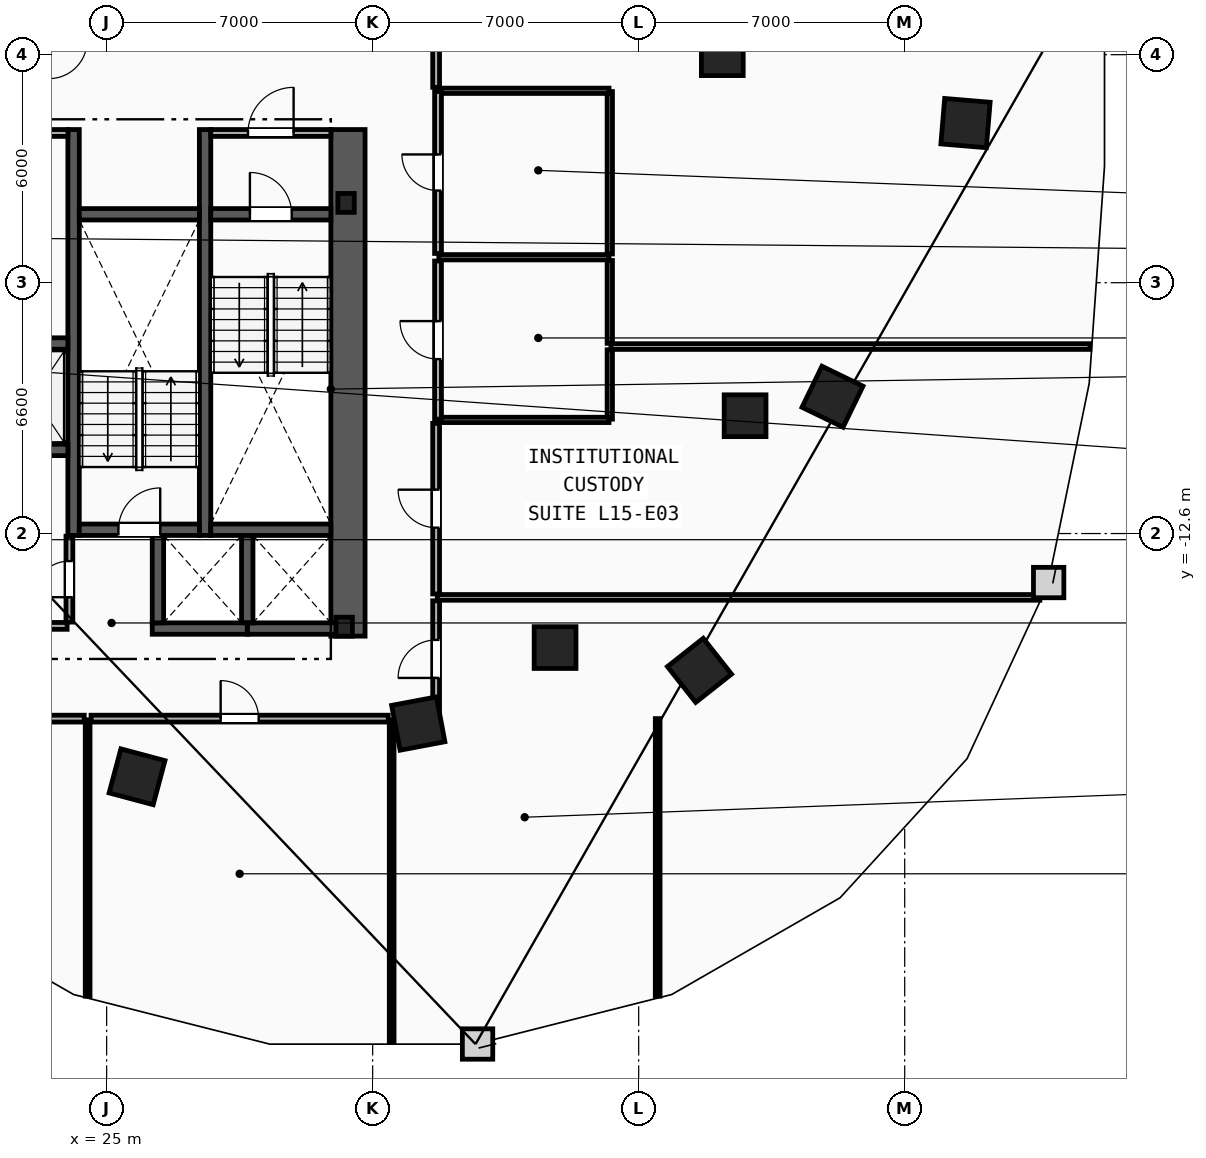
"""IFC4 building model, lengths in metres.
Left out: names, types, materials, properties, quantities, classifications, styles, units other than length and angle.
Written with IfcOpenShell. Run it as: python <this file> out.ifc"""

import sys

from ifc_helpers import new_model, si_unit, direction, frame, frame_2d, origin, origin_2d, place, context, subcontext, project, spatial, rectangle, i_section, extrude, element, fill, save


model = new_model("IFC4")
c1 = context("Model", 3, precision=1e-05, world=origin(), true_north=direction((0.0, 1.0)))
c2 = subcontext(c1, "Body", "Model", "MODEL_VIEW")
j1 = project(units=[si_unit("LENGTHUNIT", "METRE"), si_unit("PLANEANGLEUNIT", "RADIAN")], contexts=[c1])
p1 = place(None, origin())
s1 = spatial("IfcSite", under=j1, at=p1, CompositionType="ELEMENT")
p2 = place(p1, origin())
s2 = spatial("IfcBuilding", under=s1, at=p2, CompositionType="ELEMENT")
p3 = place(p2, frame((0.0, 0.0, 62.0)))
s3 = spatial("IfcBuildingStorey", under=s2, at=p3, CompositionType="ELEMENT", Elevation=62.0)
for number, where, z_axis, x_axis in (
    (1, (31.3, -3.9, 0.0), (0.0, 0.0, 1.0), (1.0, 0.0, 0.0)),
    (2, (31.25, -15.05, 0.0), (0.0, 0.0, 1.0), (1.0, 0.0, 0.0)),
):
    element("IfcColumn", number, at=place(p3, frame(where, z_axis=z_axis, x_axis=x_axis)), inside=s3, PredefinedType="COLUMN", context=c2, shape_type="SweptSolid", body=[
        extrude(i_section(OverallWidth=0.432, OverallDepth=0.498, WebThickness=0.056, FlangeThickness=0.089, FilletRadius=0.018, at=origin_2d()), origin(), (0.0, 0.0, 1.0), 3.8),
    ])
for number, where, z_axis, x_axis in (
    (3, (41.2, 0.0, 0.0), (0.0, 0.0, 1.0), (1.0, 0.0, 0.0)),
    (4, (41.8, -9.5, 0.0), (0.0, 0.0, 1.0), (1.0, 0.0, 0.0)),
    (5, (36.8, -15.6, 0.0), (0.0, 0.0, 1.0), (1.0, 0.0, 0.0)),
):
    element("IfcColumn", number, at=place(p3, frame(where, z_axis=z_axis, x_axis=x_axis)), inside=s3, PredefinedType="COLUMN", context=c2, shape_type="SweptSolid", body=[
        extrude(rectangle(XDim=1.1, YDim=1.1, at=origin_2d()), origin(), (0.0, 0.0, 1.0), 3.8),
    ])
for number, where, z_axis, x_axis in (
    (6, (25.8, -19.0, 0.0), (0.0, 0.0, 1.0), (0.966, -0.259, 0.0)),
    (7, (33.2, -17.6, 0.0), (0.0, 0.0, 1.0), (0.983, 0.186, 0.0)),
    (8, (40.6, -16.2, 0.0), (0.0, 0.0, 1.0), (0.785, 0.619, 0.0)),
    (9, (44.1, -9.0, 0.0), (0.0, 0.0, 1.0), (0.437, 0.899, 0.0)),
    (10, (47.6, -1.8, 0.0), (0.0, 0.0, 1.0), (0.084, 0.997, 0.0)),
):
    element("IfcColumn", number, at=place(p3, frame(where, z_axis=z_axis, x_axis=x_axis)), inside=s3, PredefinedType="COLUMN", context=c2, shape_type="SweptSolid", body=[
        extrude(rectangle(XDim=1.2, YDim=1.2, at=origin_2d()), origin(), (0.0, 0.0, 1.0), 3.8),
    ])
p4 = place(p3, frame((31.35, -15.3, 0.0), z_axis=(0.0, 0.0, 1.0), x_axis=(0.0, 1.0, 0.0)))
e11 = element("IfcWall", 11, at=p4, inside=s3, PredefinedType="SHEAR", context=c2, shape_type="SweptSolid", body=[
    extrude(rectangle(XDim=13.33, YDim=0.9, at=frame_2d((6.665, 0.0))), origin(), (0.0, 0.0, 1.0), 3.5),
])
for number, where, z_axis, x_axis in (
    (12, (27.59, -12.65, 0.0), (0.0, 0.0, 1.0), (0.0, 1.0, 0.0)),
    (13, (24.13, -12.65, 0.0), (0.0, 0.0, 1.0), (0.0, 1.0, 0.0)),
):
    element("IfcWall", number, at=place(p3, frame(where, z_axis=z_axis, x_axis=x_axis)), inside=s3, PredefinedType="SHEAR", context=c2, shape_type="SweptSolid", body=[
        extrude(rectangle(XDim=10.68, YDim=0.3, at=frame_2d((5.34, 0.0))), origin(), (0.0, 0.0, 1.0), 3.5),
    ])
p5 = place(p3, frame((27.74, -4.2, 0.0), z_axis=(0.0, 0.0, 1.0), x_axis=(1.0, 0.0, 0.0)))
e14 = element("IfcWall", 14, at=p5, inside=s3, PredefinedType="SHEAR", context=c2, shape_type="SweptSolid", body=[
    extrude(rectangle(XDim=3.16, YDim=0.3, at=frame_2d((1.58, 0.0))), origin(), (0.0, 0.0, 1.0), 3.5),
])
p6 = place(p5, frame((1.03, 0.0, 0.0)))
e15 = element("IfcOpeningElement", 15, at=p6, cuts=e14, PredefinedType="OPENING", context=c2, shape_type="SweptSolid", body=[
    extrude(rectangle(XDim=1.1, YDim=2.15, at=frame_2d((0.55, 1.075))), frame((0.0, 0.16, 0.0), z_axis=(0.0, -1.0, 0.0), x_axis=(1.0, 0.0, 0.0)), (0.0, 0.0, 1.0), 0.32),
])
p7 = place(p3, frame((27.74, -12.5, 0.0), z_axis=(0.0, 0.0, 1.0), x_axis=(1.0, 0.0, 0.0)))
e16 = element("IfcWall", 16, at=p7, inside=s3, PredefinedType="SHEAR", context=c2, shape_type="SweptSolid", body=[
    extrude(rectangle(XDim=3.16, YDim=0.3, at=frame_2d((1.58, 0.0))), origin(), (0.0, 0.0, 1.0), 3.5),
])
p8 = place(p3, frame((24.28, -12.5, 0.0), z_axis=(0.0, 0.0, 1.0), x_axis=(1.0, 0.0, 0.0)))
e17 = element("IfcWall", 17, at=p8, inside=s3, PredefinedType="SHEAR", context=c2, shape_type="SweptSolid", body=[
    extrude(rectangle(XDim=3.16, YDim=0.3, at=frame_2d((1.58, 0.0))), origin(), (0.0, 0.0, 1.0), 3.5),
])
p9 = place(p8, frame((1.03, 0.0, 0.0)))
e18 = element("IfcOpeningElement", 18, at=p9, cuts=e17, PredefinedType="OPENING", context=c2, shape_type="SweptSolid", body=[
    extrude(rectangle(XDim=1.1, YDim=2.15, at=frame_2d((0.55, 1.075))), frame((0.0, 0.16, 0.0), z_axis=(0.0, -1.0, 0.0), x_axis=(1.0, 0.0, 0.0)), (0.0, 0.0, 1.0), 0.32),
])
p10 = place(p3, frame((24.28, -4.2, 0.0), z_axis=(0.0, 0.0, 1.0), x_axis=(1.0, 0.0, 0.0)))
e19 = element("IfcWall", 19, at=p10, inside=s3, PredefinedType="SHEAR", context=c2, shape_type="SweptSolid", body=[
    extrude(rectangle(XDim=3.16, YDim=0.3, at=frame_2d((1.58, 0.0))), origin(), (0.0, 0.0, 1.0), 3.5),
])
p11 = place(p3, frame((20.98, -2.06, 0.0), z_axis=(0.0, 0.0, 1.0), x_axis=(1.0, 0.0, 0.0)))
e20 = element("IfcWall", 20, at=p11, inside=s3, PredefinedType="PARTITIONING", context=c2, shape_type="SweptSolid", body=[
    extrude(rectangle(XDim=3.0, YDim=0.18, at=frame_2d((1.5, 0.0))), origin(), (0.0, 0.0, 1.0), 3.5),
])
p12 = place(p11, frame((0.9, 0.0, 0.0)))
e21 = element("IfcOpeningElement", 21, at=p12, cuts=e20, PredefinedType="OPENING", context=c2, shape_type="SweptSolid", body=[
    extrude(rectangle(XDim=1.2, YDim=2.15, at=frame_2d((0.6, 1.075))), frame((0.0, 0.1, 0.0), z_axis=(0.0, -1.0, 0.0), x_axis=(1.0, 0.0, 0.0)), (0.0, 0.0, 1.0), 0.2),
])
p13 = place(p3, frame((27.74, -2.06, 0.0), z_axis=(0.0, 0.0, 1.0), x_axis=(1.0, 0.0, 0.0)))
e22 = element("IfcWall", 22, at=p13, inside=s3, PredefinedType="PARTITIONING", context=c2, shape_type="SweptSolid", body=[
    extrude(rectangle(XDim=3.16, YDim=0.18, at=frame_2d((1.58, 0.0))), origin(), (0.0, 0.0, 1.0), 3.5),
])
p14 = place(p13, frame((0.98, 0.0, 0.0)))
e23 = element("IfcOpeningElement", 23, at=p14, cuts=e22, PredefinedType="OPENING", context=c2, shape_type="SweptSolid", body=[
    extrude(rectangle(XDim=1.2, YDim=2.15, at=frame_2d((0.6, 1.075))), frame((0.0, 0.1, 0.0), z_axis=(0.0, -1.0, 0.0), x_axis=(1.0, 0.0, 0.0)), (0.0, 0.0, 1.0), 0.2),
])
p15 = place(p3, frame((21.88, -7.6, 0.0), z_axis=(0.0, 0.0, 1.0), x_axis=(1.0, 0.0, 0.0)))
e24 = element("IfcWall", 24, at=p15, inside=s3, PredefinedType="SHEAR", context=c2, shape_type="SweptSolid", body=[
    extrude(rectangle(XDim=2.1, YDim=0.3, at=frame_2d((1.05, 0.0))), origin(), (0.0, 0.0, 1.0), 3.5),
])
p16 = place(p15, frame((0.475, 0.0, 0.0)))
e25 = element("IfcOpeningElement", 25, at=p16, cuts=e24, PredefinedType="OPENING", context=c2, shape_type="SweptSolid", body=[
    extrude(rectangle(XDim=1.15, YDim=2.2, at=frame_2d((0.575, 1.1))), frame((0.0, 0.16, 0.0), z_axis=(0.0, -1.0, 0.0), x_axis=(1.0, 0.0, 0.0)), (0.0, 0.0, 1.0), 0.32),
])
p17 = place(p3, frame((21.88, -10.4, 0.0), z_axis=(0.0, 0.0, 1.0), x_axis=(1.0, 0.0, 0.0)))
e26 = element("IfcWall", 26, at=p17, inside=s3, PredefinedType="SHEAR", context=c2, shape_type="SweptSolid", body=[
    extrude(rectangle(XDim=2.1, YDim=0.3, at=frame_2d((1.05, 0.0))), origin(), (0.0, 0.0, 1.0), 3.5),
])
p18 = place(p3, frame((28.7, -15.1, 0.0), z_axis=(0.0, 0.0, 1.0), x_axis=(1.0, 0.0, 0.0)))
e27 = element("IfcWall", 27, at=p18, inside=s3, PredefinedType="SHEAR", context=c2, shape_type="SweptSolid", body=[
    extrude(rectangle(XDim=2.5, YDim=0.3, at=frame_2d((1.25, 0.0))), origin(), (0.0, 0.0, 1.0), 3.5),
])
p19 = place(p3, frame((28.7, -14.95, 0.0), z_axis=(0.0, 0.0, 1.0), x_axis=(0.0, 1.0, 0.0)))
e28 = element("IfcWall", 28, at=p19, inside=s3, PredefinedType="SHEAR", context=c2, shape_type="SweptSolid", body=[
    extrude(rectangle(XDim=2.3, YDim=0.3, at=frame_2d((1.15, 0.0))), origin(), (0.0, 0.0, 1.0), 3.5),
])
p20 = place(p3, frame((26.2, -15.1, 0.0), z_axis=(0.0, 0.0, 1.0), x_axis=(1.0, 0.0, 0.0)))
e29 = element("IfcWall", 29, at=p20, inside=s3, PredefinedType="SHEAR", context=c2, shape_type="SweptSolid", body=[
    extrude(rectangle(XDim=2.5, YDim=0.3, at=frame_2d((1.25, 0.0))), origin(), (0.0, 0.0, 1.0), 3.5),
])
p21 = place(p3, frame((26.35, -14.95, 0.0), z_axis=(0.0, 0.0, 1.0), x_axis=(0.0, 1.0, 0.0)))
e30 = element("IfcWall", 30, at=p21, inside=s3, PredefinedType="SHEAR", context=c2, shape_type="SweptSolid", body=[
    extrude(rectangle(XDim=2.3, YDim=0.3, at=frame_2d((1.15, 0.0))), origin(), (0.0, 0.0, 1.0), 3.5),
])
p22 = place(p3, frame((21.35, -15.03, 0.0), z_axis=(0.0, 0.0, 1.0), x_axis=(1.0, 0.0, 0.0)))
e31 = element("IfcWall", 31, at=p22, inside=s3, PredefinedType="PARTITIONING", context=c2, shape_type="SweptSolid", body=[
    extrude(rectangle(XDim=2.61, YDim=0.18, at=frame_2d((1.305, 0.0))), origin(), (0.0, 0.0, 1.0), 2.573),
])
p23 = place(p3, frame((24.02, -14.93, 0.0), z_axis=(0.0, 0.0, 1.0), x_axis=(0.0, 1.0, 0.0)))
e32 = element("IfcWall", 32, at=p23, inside=s3, PredefinedType="PARTITIONING", context=c2, shape_type="SweptSolid", body=[
    extrude(rectangle(XDim=2.26, YDim=0.18, at=frame_2d((1.13, 0.0))), origin(), (0.0, 0.0, 1.0), 3.5),
])
p24 = place(p23, frame((0.655, 0.0, 0.0)))
e33 = element("IfcOpeningElement", 33, at=p24, cuts=e32, PredefinedType="OPENING", context=c2, shape_type="SweptSolid", body=[
    extrude(rectangle(XDim=0.95, YDim=2.1, at=frame_2d((0.475, 1.05))), frame((0.0, 0.1, 0.0), z_axis=(0.0, -1.0, 0.0), x_axis=(1.0, 0.0, 0.0)), (0.0, 0.0, 1.0), 0.2),
])
p25 = place(p3, frame((38.24, -9.59, 0.0), z_axis=(0.0, 0.0, 1.0), x_axis=(0.0, 1.0, 0.0)))
e34 = element("IfcWall", 34, at=p25, inside=s3, PredefinedType="PARTITIONING", context=c2, shape_type="SweptSolid", body=[
    extrude(rectangle(XDim=1.825, YDim=0.14, at=frame_2d((0.913, 0.0))), origin(), (0.0, 0.0, 1.0), 3.5),
])
p26 = place(p3, frame((38.24, -7.595, 0.0), z_axis=(0.0, 0.0, 1.0), x_axis=(0.0, 1.0, 0.0)))
e35 = element("IfcWall", 35, at=p26, inside=s3, PredefinedType="PARTITIONING", context=c2, shape_type="SweptSolid", body=[
    extrude(rectangle(XDim=2.18, YDim=0.14, at=frame_2d((1.09, 0.0))), origin(), (0.0, 0.0, 1.0), 3.5),
])
p27 = place(p3, frame((38.24, -5.245, 0.0), z_axis=(0.0, 0.0, 1.0), x_axis=(0.0, 1.0, 0.0)))
e36 = element("IfcWall", 36, at=p27, inside=s3, PredefinedType="PARTITIONING", context=c2, shape_type="SweptSolid", body=[
    extrude(rectangle(XDim=4.275, YDim=0.14, at=frame_2d((2.138, 0.0))), origin(), (0.0, 0.0, 1.0), 3.5),
])
for number, where, z_axis, x_axis in (
    (37, (33.74, -0.95, 0.0), (0.0, 0.0, 1.0), (1.0, 0.0, 0.0)),
    (38, (33.74, -5.33, 0.0), (0.0, 0.0, 1.0), (1.0, 0.0, 0.0)),
    (39, (33.74, -9.61, 0.0), (0.0, 0.0, 1.0), (1.0, 0.0, 0.0)),
):
    element("IfcWall", number, at=place(p3, frame(where, z_axis=z_axis, x_axis=x_axis)), inside=s3, PredefinedType="PARTITIONING", context=c2, shape_type="SweptSolid", body=[
        extrude(rectangle(XDim=4.48, YDim=0.14, at=frame_2d((2.24, 0.0))), origin(), (0.0, 0.0, 1.0), 3.5),
    ])
p28 = place(p3, frame((33.72, -5.23, 0.0), z_axis=(0.0, 0.0, 1.0), x_axis=(0.0, 1.0, 0.0)))
e40 = element("IfcWall", 40, at=p28, inside=s3, PredefinedType="PARTITIONING", context=c2, shape_type="SweptSolid", body=[
    extrude(rectangle(XDim=4.26, YDim=0.18, at=frame_2d((2.13, 0.0))), origin(), (0.0, 0.0, 1.0), 3.5),
])
p29 = place(p28, frame((1.655, 0.0, 0.0)))
e41 = element("IfcOpeningElement", 41, at=p29, cuts=e40, PredefinedType="OPENING", context=c2, shape_type="SweptSolid", body=[
    extrude(rectangle(XDim=0.95, YDim=2.1, at=frame_2d((0.475, 1.05))), frame((0.0, 0.1, 0.0), z_axis=(0.0, -1.0, 0.0), x_axis=(1.0, 0.0, 0.0)), (0.0, 0.0, 1.0), 0.2),
])
p30 = place(p3, frame((33.72, -9.59, 0.0), z_axis=(0.0, 0.0, 1.0), x_axis=(0.0, 1.0, 0.0)))
e42 = element("IfcWall", 42, at=p30, inside=s3, PredefinedType="PARTITIONING", context=c2, shape_type="SweptSolid", body=[
    extrude(rectangle(XDim=4.16, YDim=0.18, at=frame_2d((2.08, 0.0))), origin(), (0.0, 0.0, 1.0), 3.5),
])
p31 = place(p30, frame((1.58, 0.0, 0.0)))
e43 = element("IfcOpeningElement", 43, at=p31, cuts=e42, PredefinedType="OPENING", context=c2, shape_type="SweptSolid", body=[
    extrude(rectangle(XDim=1.0, YDim=2.15, at=frame_2d((0.5, 1.075))), frame((0.0, 0.1, 0.0), z_axis=(0.0, -1.0, 0.0), x_axis=(1.0, 0.0, 0.0)), (0.0, 0.0, 1.0), 0.2),
])
p32 = place(p3, frame((38.27, -7.68, 0.0), z_axis=(0.0, 0.0, 1.0), x_axis=(1.0, 0.0, 0.0)))
e44 = element("IfcWall", 44, at=p32, inside=s3, PredefinedType="PARTITIONING", context=c2, shape_type="SweptSolid", body=[
    extrude(rectangle(XDim=12.604, YDim=0.15, at=frame_2d((6.302, 0.0))), origin(), (0.0, 0.0, 1.0), 3.5),
])
p33 = place(p3, frame((33.7, -14.28, 0.0), z_axis=(0.0, 0.0, 1.0), x_axis=(1.0, 0.0, 0.0)))
e45 = element("IfcWall", 45, at=p33, inside=s3, PredefinedType="PARTITIONING", context=c2, shape_type="SweptSolid", body=[
    extrude(rectangle(XDim=15.857, YDim=0.15, at=frame_2d((7.928, 0.0))), origin(), (0.0, 0.0, 1.0), 3.5),
])
p34 = place(p3, frame((24.5, -24.772, 0.0), z_axis=(0.0, 0.0, 1.0), x_axis=(0.0, 1.0, 0.0)))
e46 = element("IfcWall", 46, at=p34, inside=s3, PredefinedType="PARTITIONING", context=c2, shape_type="SweptSolid", body=[
    extrude(rectangle(XDim=7.272, YDim=0.125, at=frame_2d((3.636, 0.0))), origin(), (0.0, 0.0, 1.0), 3.5),
])
p35 = place(p3, frame((32.5, -25.985, 0.0), z_axis=(0.0, 0.0, 1.0), x_axis=(0.0, 1.0, 0.0)))
e47 = element("IfcWall", 47, at=p35, inside=s3, PredefinedType="PARTITIONING", context=c2, shape_type="SweptSolid", body=[
    extrude(rectangle(XDim=8.485, YDim=0.125, at=frame_2d((4.243, 0.0))), origin(), (0.0, 0.0, 1.0), 3.5),
])
p36 = place(p3, frame((39.5, -24.772, 0.0), z_axis=(0.0, 0.0, 1.0), x_axis=(0.0, 1.0, 0.0)))
e48 = element("IfcWall", 48, at=p36, inside=s3, PredefinedType="PARTITIONING", context=c2, shape_type="SweptSolid", body=[
    extrude(rectangle(XDim=7.302, YDim=0.125, at=frame_2d((3.651, 0.0))), origin(), (0.0, 0.0, 1.0), 3.5),
])
p37 = place(p3, frame((24.59, -17.47, 0.0), z_axis=(0.0, 0.0, 1.0), x_axis=(1.0, 0.0, 0.0)))
e49 = element("IfcWall", 49, at=p37, inside=s3, PredefinedType="PARTITIONING", context=c2, shape_type="SweptSolid", body=[
    extrude(rectangle(XDim=7.82, YDim=0.18, at=frame_2d((3.91, 0.0))), origin(), (0.0, 0.0, 1.0), 3.5),
])
p38 = place(p37, frame((3.41, 0.0, 0.0)))
e50 = element("IfcOpeningElement", 50, at=p38, cuts=e49, PredefinedType="OPENING", context=c2, shape_type="SweptSolid", body=[
    extrude(rectangle(XDim=1.0, YDim=2.15, at=frame_2d((0.5, 1.075))), frame((0.0, 0.1, 0.0), z_axis=(0.0, -1.0, 0.0), x_axis=(1.0, 0.0, 0.0)), (0.0, 0.0, 1.0), 0.2),
])
p39 = place(p3, frame((33.67, -17.428, 0.0), z_axis=(0.0, 0.0, 1.0), x_axis=(0.0, 1.0, 0.0)))
e51 = element("IfcWall", 51, at=p39, inside=s3, PredefinedType="PARTITIONING", context=c2, shape_type="SweptSolid", body=[
    extrude(rectangle(XDim=3.058, YDim=0.18, at=frame_2d((1.529, 0.0))), origin(), (0.0, 0.0, 1.0), 3.5),
])
p40 = place(p39, frame((1.029, 0.0, 0.0)))
e52 = element("IfcOpeningElement", 52, at=p40, cuts=e51, PredefinedType="OPENING", context=c2, shape_type="SweptSolid", body=[
    extrude(rectangle(XDim=1.0, YDim=2.15, at=frame_2d((0.5, 1.075))), frame((0.0, 0.1, 0.0), z_axis=(0.0, -1.0, 0.0), x_axis=(1.0, 0.0, 0.0)), (0.0, 0.0, 1.0), 0.2),
])
p41 = place(p3, frame((32.59, -17.47, 0.0), z_axis=(0.0, 0.0, 1.0), x_axis=(1.0, 0.0, 0.0)))
e53 = element("IfcWall", 53, at=p41, inside=s3, PredefinedType="PARTITIONING", context=c2, shape_type="SweptSolid", body=[
    extrude(rectangle(XDim=1.038, YDim=0.18, at=frame_2d((0.519, 0.0))), origin(), (0.0, 0.0, 1.0), 3.5),
])
p42 = place(p3, frame((33.67, -14.19, 0.0), z_axis=(0.0, 0.0, 1.0), x_axis=(0.0, 1.0, 0.0)))
e54 = element("IfcWall", 54, at=p42, inside=s3, PredefinedType="PARTITIONING", context=c2, shape_type="SweptSolid", body=[
    extrude(rectangle(XDim=4.489, YDim=0.18, at=frame_2d((2.244, 0.0))), origin(), (0.0, 0.0, 1.0), 3.5),
])
p43 = place(p42, frame((1.744, 0.0, 0.0)))
e55 = element("IfcOpeningElement", 55, at=p43, cuts=e54, PredefinedType="OPENING", context=c2, shape_type="SweptSolid", body=[
    extrude(rectangle(XDim=1.0, YDim=2.15, at=frame_2d((0.5, 1.075))), frame((0.0, 0.1, 0.0), z_axis=(0.0, -1.0, 0.0), x_axis=(1.0, 0.0, 0.0)), (0.0, 0.0, 1.0), 0.2),
])
p44 = place(p3, frame((16.822, -17.47, 0.0), z_axis=(0.0, 0.0, 1.0), x_axis=(1.0, 0.0, 0.0)))
e56 = element("IfcWall", 56, at=p44, inside=s3, PredefinedType="PARTITIONING", context=c2, shape_type="SweptSolid", body=[
    extrude(rectangle(XDim=7.588, YDim=0.18, at=frame_2d((3.794, 0.0))), origin(), (0.0, 0.0, 1.0), 3.5),
])
p45 = place(p3, frame((33.67, -0.859, 0.0), z_axis=(0.0, 0.0, 1.0), x_axis=(0.0, 1.0, 0.0)))
e57 = element("IfcWall", 57, at=p45, inside=s3, PredefinedType="PARTITIONING", context=c2, shape_type="SweptSolid", body=[
    extrude(rectangle(XDim=6.629, YDim=0.18, at=frame_2d((3.314, 0.0))), origin(), (0.0, 0.0, 1.0), 3.5),
])
p46 = place(p45, frame((2.814, 0.0, 0.0)))
e58 = element("IfcOpeningElement", 58, at=p46, cuts=e57, PredefinedType="OPENING", context=c2, shape_type="SweptSolid", body=[
    extrude(rectangle(XDim=1.0, YDim=2.15, at=frame_2d((0.5, 1.075))), frame((0.0, 0.1, 0.0), z_axis=(0.0, -1.0, 0.0), x_axis=(1.0, 0.0, 0.0)), (0.0, 0.0, 1.0), 0.2),
])
p47 = place(p6, origin())
e59 = element("IfcDoor", 59, at=p47, inside=s3, OperationType="SINGLE_SWING_LEFT", PredefinedType="DOOR", context=c2, shape_type="SweptSolid", body=[
    extrude(rectangle(XDim=1.1, YDim=2.15, at=frame_2d((0.55, 1.075))), frame((0.0, 0.025, 0.0), z_axis=(0.0, -1.0, 0.0), x_axis=(1.0, 0.0, 0.0)), (0.0, 0.0, 1.0), 0.05),
])
fill(e15, e59)
p48 = place(p9, origin())
e60 = element("IfcDoor", 60, at=p48, inside=s3, OperationType="SINGLE_SWING_RIGHT", PredefinedType="DOOR", context=c2, shape_type="SweptSolid", body=[
    extrude(rectangle(XDim=1.1, YDim=2.15, at=frame_2d((0.55, 1.075))), frame((0.0, 0.025, 0.0), z_axis=(0.0, -1.0, 0.0), x_axis=(1.0, 0.0, 0.0)), (0.0, 0.0, 1.0), 0.05),
])
fill(e18, e60)
p49 = place(p14, origin())
e61 = element("IfcDoor", 61, at=p49, inside=s3, OperationType="SINGLE_SWING_RIGHT", PredefinedType="DOOR", context=c2, shape_type="SweptSolid", body=[
    extrude(rectangle(XDim=1.2, YDim=2.15, at=frame_2d((0.6, 1.075))), frame((0.0, 0.025, 0.0), z_axis=(0.0, -1.0, 0.0), x_axis=(1.0, 0.0, 0.0)), (0.0, 0.0, 1.0), 0.05),
])
fill(e23, e61)
p50 = place(p38, origin())
e62 = element("IfcDoor", 62, at=p50, inside=s3, OperationType="SINGLE_SWING_LEFT", PredefinedType="DOOR", context=c2, shape_type="SweptSolid", body=[
    extrude(rectangle(XDim=1.0, YDim=2.15, at=frame_2d((0.5, 1.075))), frame((0.0, 0.025, 0.0), z_axis=(0.0, -1.0, 0.0), x_axis=(1.0, 0.0, 0.0)), (0.0, 0.0, 1.0), 0.05),
])
fill(e50, e62)
p51 = place(p43, origin())
e63 = element("IfcDoor", 63, at=p51, inside=s3, OperationType="SINGLE_SWING_RIGHT", PredefinedType="DOOR", context=c2, shape_type="SweptSolid", body=[
    extrude(rectangle(XDim=1.0, YDim=2.15, at=frame_2d((0.5, 1.075))), frame((0.0, 0.025, 0.0), z_axis=(0.0, -1.0, 0.0), x_axis=(1.0, 0.0, 0.0)), (0.0, 0.0, 1.0), 0.05),
])
fill(e55, e63)
p52 = place(p29, origin())
e64 = element("IfcDoor", 64, at=p52, inside=s3, OperationType="SINGLE_SWING_RIGHT", PredefinedType="DOOR", context=c2, shape_type="SweptSolid", body=[
    extrude(rectangle(XDim=0.95, YDim=2.1, at=frame_2d((0.475, 1.05))), frame((0.0, 0.025, 0.0), z_axis=(0.0, -1.0, 0.0), x_axis=(1.0, 0.0, 0.0)), (0.0, 0.0, 1.0), 0.05),
])
fill(e41, e64)
p53 = place(p31, origin())
e65 = element("IfcDoor", 65, at=p53, inside=s3, OperationType="SINGLE_SWING_RIGHT", PredefinedType="DOOR", context=c2, shape_type="SweptSolid", body=[
    extrude(rectangle(XDim=1.0, YDim=2.15, at=frame_2d((0.5, 1.075))), frame((0.0, 0.025, 0.0), z_axis=(0.0, -1.0, 0.0), x_axis=(1.0, 0.0, 0.0)), (0.0, 0.0, 1.0), 0.05),
])
fill(e43, e65)
p54 = place(p40, origin())
e66 = element("IfcDoor", 66, at=p54, inside=s3, OperationType="SINGLE_SWING_LEFT", PredefinedType="DOOR", context=c2, shape_type="SweptSolid", body=[
    extrude(rectangle(XDim=1.0, YDim=2.15, at=frame_2d((0.5, 1.075))), frame((0.0, 0.025, 0.0), z_axis=(0.0, -1.0, 0.0), x_axis=(1.0, 0.0, 0.0)), (0.0, 0.0, 1.0), 0.05),
])
fill(e52, e66)
p55 = place(p24, origin())
e67 = element("IfcDoor", 67, at=p55, inside=s3, OperationType="SINGLE_SWING_LEFT", PredefinedType="DOOR", context=c2, shape_type="SweptSolid", body=[
    extrude(rectangle(XDim=0.95, YDim=2.1, at=frame_2d((0.475, 1.05))), frame((0.0, 0.025, 0.0), z_axis=(0.0, -1.0, 0.0), x_axis=(1.0, 0.0, 0.0)), (0.0, 0.0, 1.0), 0.05),
])
fill(e33, e67)
save(model, sys.argv[1])
